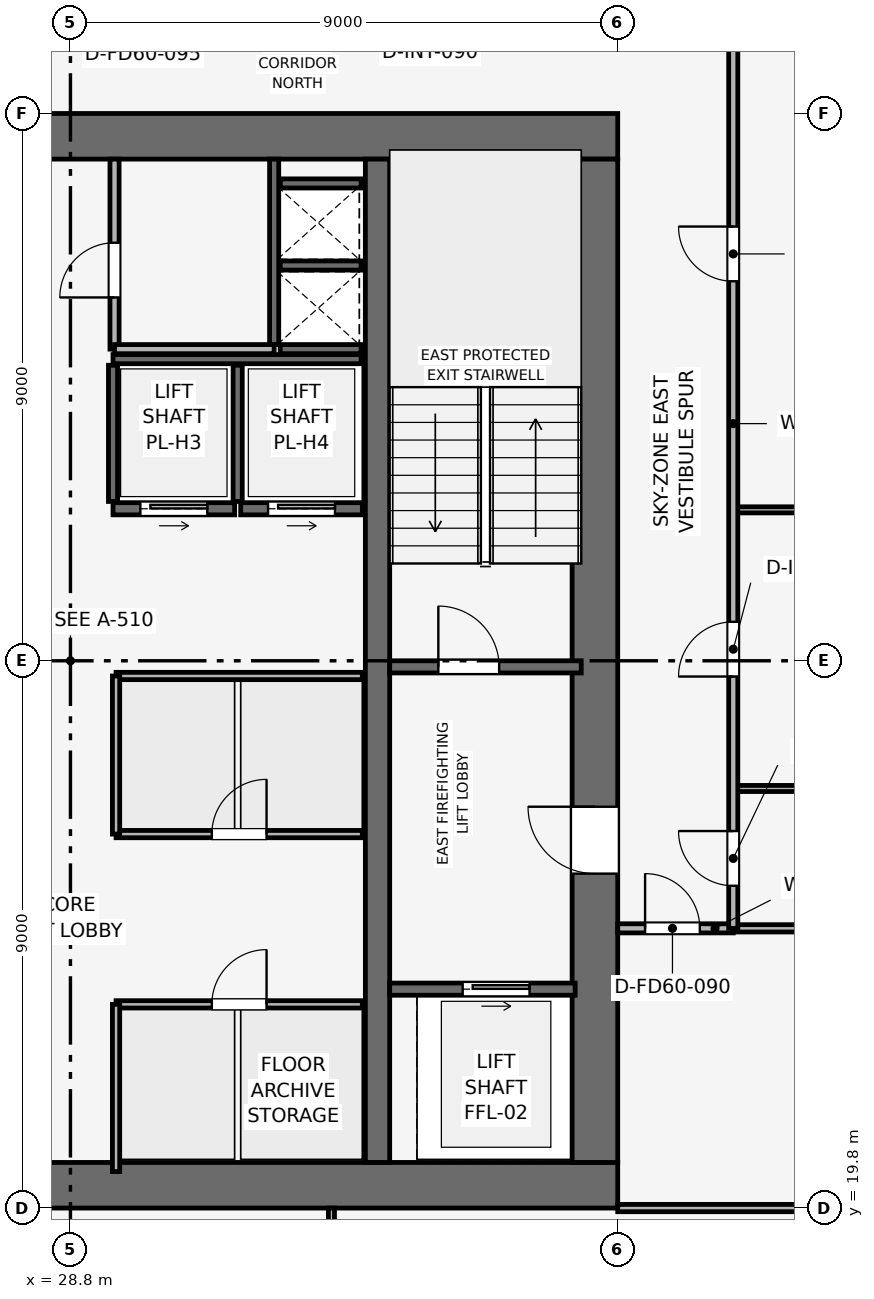
"""IFC4 building model, lengths in metres.
Left out: names, types, materials, properties, quantities, classifications, styles, units other than length and angle.
Written with IfcOpenShell. Run it as: python <this file> out.ifc"""

import sys

from ifc_helpers import new_model, si_unit, direction, frame, frame_2d, origin, place, context, subcontext, project, spatial, rectangle, extrude, element, fill, save


model = new_model("IFC4")
c1 = context("Model", 3, precision=1e-05, world=origin(), true_north=direction((0.0, 1.0)))
c2 = subcontext(c1, "Body", "Model", "MODEL_VIEW")
j1 = project(units=[si_unit("LENGTHUNIT", "METRE"), si_unit("PLANEANGLEUNIT", "RADIAN")], contexts=[c1])
p1 = place(None, origin())
s1 = spatial("IfcSite", under=j1, at=p1, CompositionType="ELEMENT")
p2 = place(p1, origin())
s2 = spatial("IfcBuilding", under=s1, at=p2, CompositionType="ELEMENT")
p3 = place(p2, frame((0.0, 0.0, 250.35)))
s3 = spatial("IfcBuildingStorey", under=s2, at=p3, CompositionType="ELEMENT", Elevation=250.35)
p4 = place(p3, frame((19.8, 20.175, 0.0), z_axis=(0.0, 0.0, 1.0), x_axis=(1.0, 0.0, 0.0)))
e1 = element("IfcWall", 1, at=p4, inside=s3, PredefinedType="SHEAR", context=c2, shape_type="SweptSolid", body=[
    extrude(rectangle(XDim=18.0, YDim=0.75, at=frame_2d((9.0, 0.0))), origin(), (0.0, 0.0, 1.0), 3.75),
])
p5 = place(p3, frame((19.8, 37.425, 0.0), z_axis=(0.0, 0.0, 1.0), x_axis=(1.0, 0.0, 0.0)))
e2 = element("IfcWall", 2, at=p5, inside=s3, PredefinedType="SHEAR", context=c2, shape_type="SweptSolid", body=[
    extrude(rectangle(XDim=18.0, YDim=0.75, at=frame_2d((9.0, 0.0))), origin(), (0.0, 0.0, 1.0), 3.75),
])
p6 = place(p5, frame((7.05, 0.0, 0.0)))
e3 = element("IfcOpeningElement", 3, at=p6, cuts=e2, PredefinedType="OPENING", context=c2, shape_type="SweptSolid", body=[
    extrude(rectangle(XDim=1.1, YDim=2.15, at=frame_2d((0.55, 1.075))), frame((0.0, 0.385, 0.0), z_axis=(0.0, -1.0, 0.0), x_axis=(1.0, 0.0, 0.0)), (0.0, 0.0, 1.0), 0.77),
])
p7 = place(p3, frame((37.425, 20.55, 0.0), z_axis=(0.0, 0.0, 1.0), x_axis=(0.0, 1.0, 0.0)))
e4 = element("IfcWall", 4, at=p7, inside=s3, PredefinedType="SHEAR", context=c2, shape_type="SweptSolid", body=[
    extrude(rectangle(XDim=16.5, YDim=0.75, at=frame_2d((8.25, 0.0))), origin(), (0.0, 0.0, 1.0), 3.75),
])
p8 = place(p7, frame((4.75, 0.0, 0.0)))
e5 = element("IfcOpeningElement", 5, at=p8, cuts=e4, PredefinedType="OPENING", context=c2, shape_type="SweptSolid", body=[
    extrude(rectangle(XDim=1.1, YDim=2.15, at=frame_2d((0.55, 1.075))), frame((0.0, 0.385, 0.0), z_axis=(0.0, -1.0, 0.0), x_axis=(1.0, 0.0, 0.0)), (0.0, 0.0, 1.0), 0.77),
])
p9 = place(p3, frame((33.85, 20.55, 0.0), z_axis=(0.0, 0.0, 1.0), x_axis=(0.0, 1.0, 0.0)))
e6 = element("IfcWall", 6, at=p9, inside=s3, PredefinedType="SHEAR", context=c2, shape_type="SweptSolid", body=[
    extrude(rectangle(XDim=16.5, YDim=0.4, at=frame_2d((8.25, 0.0))), origin(), (0.0, 0.0, 1.0), 3.75),
])
p10 = place(p3, frame((34.05, 28.7, 0.0), z_axis=(0.0, 0.0, 1.0), x_axis=(1.0, 0.0, 0.0)))
e7 = element("IfcWall", 7, at=p10, inside=s3, PredefinedType="SHEAR", context=c2, shape_type="SweptSolid", body=[
    extrude(rectangle(XDim=3.15, YDim=0.2, at=frame_2d((1.575, 0.0))), origin(), (0.0, 0.0, 1.0), 3.5),
])
p11 = place(p10, frame((0.8, 0.0, 0.0)))
e8 = element("IfcOpeningElement", 8, at=p11, cuts=e7, PredefinedType="OPENING", context=c2, shape_type="SweptSolid", body=[
    extrude(rectangle(XDim=1.0, YDim=2.1, at=frame_2d((0.5, 1.05))), frame((0.0, 0.11, 0.0), z_axis=(0.0, -1.0, 0.0), x_axis=(1.0, 0.0, 0.0)), (0.0, 0.0, 1.0), 0.22),
])
p12 = place(p3, frame((32.15, 34.0, 0.0), z_axis=(0.0, 0.0, 1.0), x_axis=(0.0, 1.0, 0.0)))
e9 = element("IfcWall", 9, at=p12, inside=s3, PredefinedType="SHEAR", context=c2, shape_type="SweptSolid", body=[
    extrude(rectangle(XDim=3.05, YDim=0.15, at=frame_2d((1.525, 0.0))), origin(), (0.0, 0.0, 1.0), 3.5),
])
for number, where, z_axis, x_axis in (
    (10, (32.25, 33.925, 0.0), (0.0, 0.0, 1.0), (1.0, 0.0, 0.0)),
    (11, (32.25, 35.3, 0.0), (0.0, 0.0, 1.0), (1.0, 0.0, 0.0)),
):
    element("IfcWall", number, at=place(p3, frame(where, z_axis=z_axis, x_axis=x_axis)), inside=s3, PredefinedType="SHEAR", context=c2, shape_type="SweptSolid", body=[
        extrude(rectangle(XDim=1.33, YDim=0.15, at=frame_2d((0.665, 0.0))), origin(), (0.0, 0.0, 1.0), 3.5),
    ])
p13 = place(p3, frame((34.05, 23.4, 0.0), z_axis=(0.0, 0.0, 1.0), x_axis=(1.0, 0.0, 0.0)))
e12 = element("IfcWall", 12, at=p13, inside=s3, PredefinedType="SHEAR", context=c2, shape_type="SweptSolid", body=[
    extrude(rectangle(XDim=3.05, YDim=0.2, at=frame_2d((1.525, 0.0))), origin(), (0.0, 0.0, 1.0), 3.5),
])
p14 = place(p13, frame((1.2, 0.0, 0.0)))
e13 = element("IfcOpeningElement", 13, at=p14, cuts=e12, PredefinedType="OPENING", context=c2, shape_type="SweptSolid", body=[
    extrude(rectangle(XDim=1.1, YDim=2.15, at=frame_2d((0.55, 1.075))), frame((0.0, 0.11, 0.0), z_axis=(0.0, -1.0, 0.0), x_axis=(1.0, 0.0, 0.0)), (0.0, 0.0, 1.0), 0.22),
])
p15 = place(p3, frame((29.5, 31.3, 0.0), z_axis=(0.0, 0.0, 1.0), x_axis=(1.0, 0.0, 0.0)))
e14 = element("IfcWall", 14, at=p15, inside=s3, PredefinedType="SHEAR", context=c2, shape_type="SweptSolid", body=[
    extrude(rectangle(XDim=2.0, YDim=0.2, at=frame_2d((1.0, 0.0))), origin(), (0.0, 0.0, 1.0), 3.5),
])
p16 = place(p15, frame((0.45, 0.0, 0.0)))
e15 = element("IfcOpeningElement", 15, at=p16, cuts=e14, PredefinedType="OPENING", context=c2, shape_type="SweptSolid", body=[
    extrude(rectangle(XDim=1.1, YDim=2.15, at=frame_2d((0.55, 1.075))), frame((0.0, 0.11, 0.0), z_axis=(0.0, -1.0, 0.0), x_axis=(1.0, 0.0, 0.0)), (0.0, 0.0, 1.0), 0.22),
])
p17 = place(p3, frame((31.6, 31.3, 0.0), z_axis=(0.0, 0.0, 1.0), x_axis=(1.0, 0.0, 0.0)))
e16 = element("IfcWall", 16, at=p17, inside=s3, PredefinedType="SHEAR", context=c2, shape_type="SweptSolid", body=[
    extrude(rectangle(XDim=2.0, YDim=0.2, at=frame_2d((1.0, 0.0))), origin(), (0.0, 0.0, 1.0), 3.5),
])
p18 = place(p17, frame((0.45, 0.0, 0.0)))
e17 = element("IfcOpeningElement", 17, at=p18, cuts=e16, PredefinedType="OPENING", context=c2, shape_type="SweptSolid", body=[
    extrude(rectangle(XDim=1.1, YDim=2.15, at=frame_2d((0.55, 1.075))), frame((0.0, 0.11, 0.0), z_axis=(0.0, -1.0, 0.0), x_axis=(1.0, 0.0, 0.0)), (0.0, 0.0, 1.0), 0.22),
])
p19 = place(p3, frame((32.25, 36.65, 0.0), z_axis=(0.0, 0.0, 1.0), x_axis=(1.0, 0.0, 0.0)))
e18 = element("IfcWall", 18, at=p19, inside=s3, PredefinedType="SHEAR", context=c2, shape_type="SweptSolid", body=[
    extrude(rectangle(XDim=1.33, YDim=0.15, at=frame_2d((0.665, 0.0))), origin(), (0.0, 0.0, 1.0), 3.5),
])
p20 = place(p3, frame((29.5, 33.76, 0.0), z_axis=(0.0, 0.0, 1.0), x_axis=(1.0, 0.0, 0.0)))
e19 = element("IfcWall", 19, at=p20, inside=s3, PredefinedType="SHEAR", context=c2, shape_type="SweptSolid", body=[
    extrude(rectangle(XDim=4.08, YDim=0.15, at=frame_2d((2.04, 0.0))), origin(), (0.0, 0.0, 1.0), 3.5),
])
for number, where, z_axis, x_axis in (
    (20, (29.5, 31.42, 0.0), (0.0, 0.0, 1.0), (0.0, 1.0, 0.0)),
    (21, (31.55, 31.42, 0.0), (0.0, 0.0, 1.0), (0.0, 1.0, 0.0)),
):
    element("IfcWall", number, at=place(p3, frame(where, z_axis=z_axis, x_axis=x_axis)), inside=s3, PredefinedType="SHEAR", context=c2, shape_type="SweptSolid", body=[
        extrude(rectangle(XDim=2.24, YDim=0.15, at=frame_2d((1.12, 0.0))), origin(), (0.0, 0.0, 1.0), 3.5),
    ])
p21 = place(p3, frame((29.525, 33.925, 0.0), z_axis=(0.0, 0.0, 1.0), x_axis=(0.0, 1.0, 0.0)))
e22 = element("IfcWall", 22, at=p21, inside=s3, PredefinedType="PARTITIONING", context=c2, shape_type="SweptSolid", body=[
    extrude(rectangle(XDim=3.125, YDim=0.15, at=frame_2d((1.562, 0.0))), origin(), (0.0, 0.0, 1.0), 3.5),
])
p22 = place(p21, frame((0.85, 0.0, 0.0)))
e23 = element("IfcOpeningElement", 23, at=p22, cuts=e22, PredefinedType="OPENING", context=c2, shape_type="SweptSolid", body=[
    extrude(rectangle(XDim=0.9, YDim=2.1, at=frame_2d((0.45, 1.05))), frame((0.0, 0.085, 0.0), z_axis=(0.0, -1.0, 0.0), x_axis=(1.0, 0.0, 0.0)), (0.0, 0.0, 1.0), 0.17),
])
p23 = place(p3, frame((29.525, 33.925, 0.0), z_axis=(0.0, 0.0, 1.0), x_axis=(1.0, 0.0, 0.0)))
e24 = element("IfcWall", 24, at=p23, inside=s3, PredefinedType="PARTITIONING", context=c2, shape_type="SweptSolid", body=[
    extrude(rectangle(XDim=2.625, YDim=0.15, at=frame_2d((1.312, 0.0))), origin(), (0.0, 0.0, 1.0), 3.5),
])
p24 = place(p3, frame((29.55, 23.15, 0.0), z_axis=(0.0, 0.0, 1.0), x_axis=(1.0, 0.0, 0.0)))
e25 = element("IfcWall", 25, at=p24, inside=s3, PredefinedType="PARTITIONING", context=c2, shape_type="SweptSolid", body=[
    extrude(rectangle(XDim=4.05, YDim=0.12, at=frame_2d((2.025, 0.0))), origin(), (0.0, 0.0, 1.0), 3.5),
])
p25 = place(p24, frame((1.575, 0.0, 0.0)))
e26 = element("IfcOpeningElement", 26, at=p25, cuts=e25, PredefinedType="OPENING", context=c2, shape_type="SweptSolid", body=[
    extrude(rectangle(XDim=0.9, YDim=2.1, at=frame_2d((0.45, 1.05))), frame((0.0, 0.07, 0.0), z_axis=(0.0, -1.0, 0.0), x_axis=(1.0, 0.0, 0.0)), (0.0, 0.0, 1.0), 0.14),
])
p26 = place(p3, frame((29.55, 20.4, 0.0), z_axis=(0.0, 0.0, 1.0), x_axis=(0.0, 1.0, 0.0)))
e27 = element("IfcWall", 27, at=p26, inside=s3, PredefinedType="PARTITIONING", context=c2, shape_type="SweptSolid", body=[
    extrude(rectangle(XDim=2.75, YDim=0.12, at=frame_2d((1.375, 0.0))), origin(), (0.0, 0.0, 1.0), 3.5),
])
p27 = place(p3, frame((29.55, 25.95, 0.0), z_axis=(0.0, 0.0, 1.0), x_axis=(1.0, 0.0, 0.0)))
e28 = element("IfcWall", 28, at=p27, inside=s3, PredefinedType="PARTITIONING", context=c2, shape_type="SweptSolid", body=[
    extrude(rectangle(XDim=4.05, YDim=0.12, at=frame_2d((2.025, 0.0))), origin(), (0.0, 0.0, 1.0), 3.5),
])
p28 = place(p27, frame((1.575, 0.0, 0.0)))
e29 = element("IfcOpeningElement", 29, at=p28, cuts=e28, PredefinedType="OPENING", context=c2, shape_type="SweptSolid", body=[
    extrude(rectangle(XDim=0.9, YDim=2.1, at=frame_2d((0.45, 1.05))), frame((0.0, 0.07, 0.0), z_axis=(0.0, -1.0, 0.0), x_axis=(1.0, 0.0, 0.0)), (0.0, 0.0, 1.0), 0.14),
])
p29 = place(p3, frame((29.55, 28.55, 0.0), z_axis=(0.0, 0.0, 1.0), x_axis=(1.0, 0.0, 0.0)))
e30 = element("IfcWall", 30, at=p29, inside=s3, PredefinedType="PARTITIONING", context=c2, shape_type="SweptSolid", body=[
    extrude(rectangle(XDim=4.05, YDim=0.12, at=frame_2d((2.025, 0.0))), origin(), (0.0, 0.0, 1.0), 3.5),
])
p30 = place(p3, frame((29.55, 25.95, 0.0), z_axis=(0.0, 0.0, 1.0), x_axis=(0.0, 1.0, 0.0)))
e31 = element("IfcWall", 31, at=p30, inside=s3, PredefinedType="PARTITIONING", context=c2, shape_type="SweptSolid", body=[
    extrude(rectangle(XDim=2.6, YDim=0.12, at=frame_2d((1.3, 0.0))), origin(), (0.0, 0.0, 1.0), 3.5),
])
p31 = place(p3, frame((33.092, 4.03, 0.0), z_axis=(0.0, 0.0, 1.0), x_axis=(0.0, 1.0, 0.0)))
e32 = element("IfcWall", 32, at=p31, inside=s3, PredefinedType="MOVABLE", context=c2, shape_type="SweptSolid", body=[
    extrude(rectangle(XDim=15.77, YDim=0.1, at=frame_2d((7.885, 0.0))), origin(), (0.0, 0.0, 1.0), 3.085),
])
p32 = place(p31, frame((13.37, 0.0, 0.0)))
e33 = element("IfcOpeningElement", 33, at=p32, cuts=e32, PredefinedType="OPENING", context=c2, shape_type="SweptSolid", body=[
    extrude(rectangle(XDim=0.9, YDim=2.1, at=frame_2d((0.45, 1.05))), frame((0.0, 0.06, 0.0), z_axis=(0.0, -1.0, 0.0), x_axis=(1.0, 0.0, 0.0)), (0.0, 0.0, 1.0), 0.12),
])
p33 = place(p3, frame((37.8, 19.8, 0.0), z_axis=(0.0, 0.0, 1.0), x_axis=(1.0, 0.0, 0.0)))
e34 = element("IfcWall", 34, at=p33, inside=s3, PredefinedType="PARTITIONING", context=c2, shape_type="SweptSolid", body=[
    extrude(rectangle(XDim=15.77, YDim=0.12, at=frame_2d((7.885, 0.0))), origin(), (0.0, 0.0, 1.0), 3.085),
])
p34 = place(p3, frame((37.8, 24.4, 0.0), z_axis=(0.0, 0.0, 1.0), x_axis=(1.0, 0.0, 0.0)))
e35 = element("IfcWall", 35, at=p34, inside=s3, PredefinedType="PARTITIONING", context=c2, shape_type="SweptSolid", body=[
    extrude(rectangle(XDim=1.9, YDim=0.15, at=frame_2d((0.95, 0.0))), origin(), (0.0, 0.0, 1.0), 3.5),
])
p35 = place(p34, frame((0.45, 0.0, 0.0)))
e36 = element("IfcOpeningElement", 36, at=p35, cuts=e35, PredefinedType="OPENING", context=c2, shape_type="SweptSolid", body=[
    extrude(rectangle(XDim=0.9, YDim=2.1, at=frame_2d((0.45, 1.05))), frame((0.0, 0.085, 0.0), z_axis=(0.0, -1.0, 0.0), x_axis=(1.0, 0.0, 0.0)), (0.0, 0.0, 1.0), 0.17),
])
p36 = place(p3, frame((39.7, 24.4, 0.0), z_axis=(0.0, 0.0, 1.0), x_axis=(1.0, 0.0, 0.0)))
e37 = element("IfcWall", 37, at=p36, inside=s3, PredefinedType="PARTITIONING", context=c2, shape_type="SweptSolid", body=[
    extrude(rectangle(XDim=13.87, YDim=0.12, at=frame_2d((6.935, 0.0))), origin(), (0.0, 0.0, 1.0), 3.085),
])
for number, where, z_axis, x_axis in (
    (38, (39.7, 26.7, 0.0), (0.0, 0.0, 1.0), (1.0, 0.0, 0.0)),
    (39, (39.7, 31.282, 0.0), (0.0, 0.0, 1.0), (1.0, 0.0, 0.0)),
):
    element("IfcWall", number, at=place(p3, frame(where, z_axis=z_axis, x_axis=x_axis)), inside=s3, PredefinedType="MOVABLE", context=c2, shape_type="SweptSolid", body=[
        extrude(rectangle(XDim=13.87, YDim=0.1, at=frame_2d((6.935, 0.0))), origin(), (0.0, 0.0, 1.0), 3.085),
    ])
p37 = place(p3, frame((39.7, 24.4, 0.0), z_axis=(0.0, 0.0, 1.0), x_axis=(0.0, 1.0, 0.0)))
e40 = element("IfcWall", 40, at=p37, inside=s3, PredefinedType="PARTITIONING", context=c2, shape_type="SweptSolid", body=[
    extrude(rectangle(XDim=15.3, YDim=0.15, at=frame_2d((7.65, 0.0))), origin(), (0.0, 0.0, 1.0), 3.085),
])
p38 = place(p37, frame((0.7, 0.0, 0.0)))
e41 = element("IfcOpeningElement", 41, at=p38, cuts=e40, PredefinedType="OPENING", context=c2, shape_type="SweptSolid", body=[
    extrude(rectangle(XDim=0.9, YDim=2.1, at=frame_2d((0.45, 1.05))), frame((0.0, 0.085, 0.0), z_axis=(0.0, -1.0, 0.0), x_axis=(1.0, 0.0, 0.0)), (0.0, 0.0, 1.0), 0.17),
])
p39 = place(p37, frame((4.141, 0.0, 0.0)))
e42 = element("IfcOpeningElement", 42, at=p39, cuts=e40, PredefinedType="OPENING", context=c2, shape_type="SweptSolid", body=[
    extrude(rectangle(XDim=0.9, YDim=2.1, at=frame_2d((0.45, 1.05))), frame((0.0, 0.085, 0.0), z_axis=(0.0, -1.0, 0.0), x_axis=(1.0, 0.0, 0.0)), (0.0, 0.0, 1.0), 0.17),
])
p40 = place(p37, frame((10.641, 0.0, 0.0)))
e43 = element("IfcOpeningElement", 43, at=p40, cuts=e40, PredefinedType="OPENING", context=c2, shape_type="SweptSolid", body=[
    extrude(rectangle(XDim=0.9, YDim=2.1, at=frame_2d((0.45, 1.05))), frame((0.0, 0.085, 0.0), z_axis=(0.0, -1.0, 0.0), x_axis=(1.0, 0.0, 0.0)), (0.0, 0.0, 1.0), 0.17),
])
p41 = place(p11, origin())
e44 = element("IfcDoor", 44, at=p41, inside=s3, OperationType="SINGLE_SWING_LEFT", PredefinedType="DOOR", context=c2, shape_type="SweptSolid", body=[
    extrude(rectangle(XDim=1.0, YDim=2.1, at=frame_2d((0.5, 1.05))), frame((0.0, 0.025, 0.0), z_axis=(0.0, -1.0, 0.0), x_axis=(1.0, 0.0, 0.0)), (0.0, 0.0, 1.0), 0.05),
])
fill(e8, e44)
p42 = place(p14, origin())
e45 = element("IfcDoor", 45, at=p42, inside=s3, OperationType="SLIDING_TO_RIGHT", PredefinedType="DOOR", context=c2, shape_type="SweptSolid", body=[
    extrude(rectangle(XDim=1.1, YDim=2.15, at=frame_2d((0.55, 1.075))), frame((0.0, 0.025, 0.0), z_axis=(0.0, -1.0, 0.0), x_axis=(1.0, 0.0, 0.0)), (0.0, 0.0, 1.0), 0.05),
])
fill(e13, e45)
p43 = place(p16, origin())
e46 = element("IfcDoor", 46, at=p43, inside=s3, OperationType="SLIDING_TO_RIGHT", PredefinedType="DOOR", context=c2, shape_type="SweptSolid", body=[
    extrude(rectangle(XDim=1.1, YDim=2.15, at=frame_2d((0.55, 1.075))), frame((0.0, 0.025, 0.0), z_axis=(0.0, -1.0, 0.0), x_axis=(1.0, 0.0, 0.0)), (0.0, 0.0, 1.0), 0.05),
])
fill(e15, e46)
p44 = place(p18, origin())
e47 = element("IfcDoor", 47, at=p44, inside=s3, OperationType="SLIDING_TO_RIGHT", PredefinedType="DOOR", context=c2, shape_type="SweptSolid", body=[
    extrude(rectangle(XDim=1.1, YDim=2.15, at=frame_2d((0.55, 1.075))), frame((0.0, 0.025, 0.0), z_axis=(0.0, -1.0, 0.0), x_axis=(1.0, 0.0, 0.0)), (0.0, 0.0, 1.0), 0.05),
])
fill(e17, e47)
p45 = place(p22, origin())
e48 = element("IfcDoor", 48, at=p45, inside=s3, OperationType="SINGLE_SWING_LEFT", PredefinedType="DOOR", context=c2, shape_type="SweptSolid", body=[
    extrude(rectangle(XDim=0.9, YDim=2.1, at=frame_2d((0.45, 1.05))), frame((0.0, 0.025, 0.0), z_axis=(0.0, -1.0, 0.0), x_axis=(1.0, 0.0, 0.0)), (0.0, 0.0, 1.0), 0.05),
])
fill(e23, e48)
p46 = place(p25, origin())
e49 = element("IfcDoor", 49, at=p46, inside=s3, OperationType="SINGLE_SWING_RIGHT", PredefinedType="DOOR", context=c2, shape_type="SweptSolid", body=[
    extrude(rectangle(XDim=0.9, YDim=2.1, at=frame_2d((0.45, 1.05))), frame((0.0, 0.025, 0.0), z_axis=(0.0, -1.0, 0.0), x_axis=(1.0, 0.0, 0.0)), (0.0, 0.0, 1.0), 0.05),
])
fill(e26, e49)
p47 = place(p28, origin())
e50 = element("IfcDoor", 50, at=p47, inside=s3, OperationType="SINGLE_SWING_RIGHT", PredefinedType="DOOR", context=c2, shape_type="SweptSolid", body=[
    extrude(rectangle(XDim=0.9, YDim=2.1, at=frame_2d((0.45, 1.05))), frame((0.0, 0.025, 0.0), z_axis=(0.0, -1.0, 0.0), x_axis=(1.0, 0.0, 0.0)), (0.0, 0.0, 1.0), 0.05),
])
fill(e29, e50)
p48 = place(p35, origin())
e51 = element("IfcDoor", 51, at=p48, inside=s3, OperationType="SINGLE_SWING_LEFT", PredefinedType="DOOR", context=c2, shape_type="SweptSolid", body=[
    extrude(rectangle(XDim=0.9, YDim=2.1, at=frame_2d((0.45, 1.05))), frame((0.0, 0.025, 0.0), z_axis=(0.0, -1.0, 0.0), x_axis=(1.0, 0.0, 0.0)), (0.0, 0.0, 1.0), 0.05),
])
fill(e36, e51)
p49 = place(p38, origin())
e52 = element("IfcDoor", 52, at=p49, inside=s3, OperationType="SINGLE_SWING_RIGHT", PredefinedType="DOOR", context=c2, shape_type="SweptSolid", body=[
    extrude(rectangle(XDim=0.9, YDim=2.1, at=frame_2d((0.45, 1.05))), frame((0.0, 0.025, 0.0), z_axis=(0.0, -1.0, 0.0), x_axis=(1.0, 0.0, 0.0)), (0.0, 0.0, 1.0), 0.05),
])
fill(e41, e52)
p50 = place(p39, origin())
e53 = element("IfcDoor", 53, at=p50, inside=s3, OperationType="SINGLE_SWING_LEFT", PredefinedType="DOOR", context=c2, shape_type="SweptSolid", body=[
    extrude(rectangle(XDim=0.9, YDim=2.1, at=frame_2d((0.45, 1.05))), frame((0.0, 0.025, 0.0), z_axis=(0.0, -1.0, 0.0), x_axis=(1.0, 0.0, 0.0)), (0.0, 0.0, 1.0), 0.05),
])
fill(e42, e53)
p51 = place(p40, origin())
e54 = element("IfcDoor", 54, at=p51, inside=s3, OperationType="SINGLE_SWING_RIGHT", PredefinedType="DOOR", context=c2, shape_type="SweptSolid", body=[
    extrude(rectangle(XDim=0.9, YDim=2.1, at=frame_2d((0.45, 1.05))), frame((0.0, 0.025, 0.0), z_axis=(0.0, -1.0, 0.0), x_axis=(1.0, 0.0, 0.0)), (0.0, 0.0, 1.0), 0.05),
])
fill(e43, e54)
p52 = place(p8, origin())
e55 = element("IfcDoor", 55, at=p52, inside=s3, OperationType="SINGLE_SWING_RIGHT", PredefinedType="DOOR", context=c2, shape_type="SweptSolid", body=[
    extrude(rectangle(XDim=1.1, YDim=2.15, at=frame_2d((0.55, 1.075))), frame((0.0, 0.025, 0.0), z_axis=(0.0, -1.0, 0.0), x_axis=(1.0, 0.0, 0.0)), (0.0, 0.0, 1.0), 0.05),
])
fill(e5, e55)
save(model, sys.argv[1])
